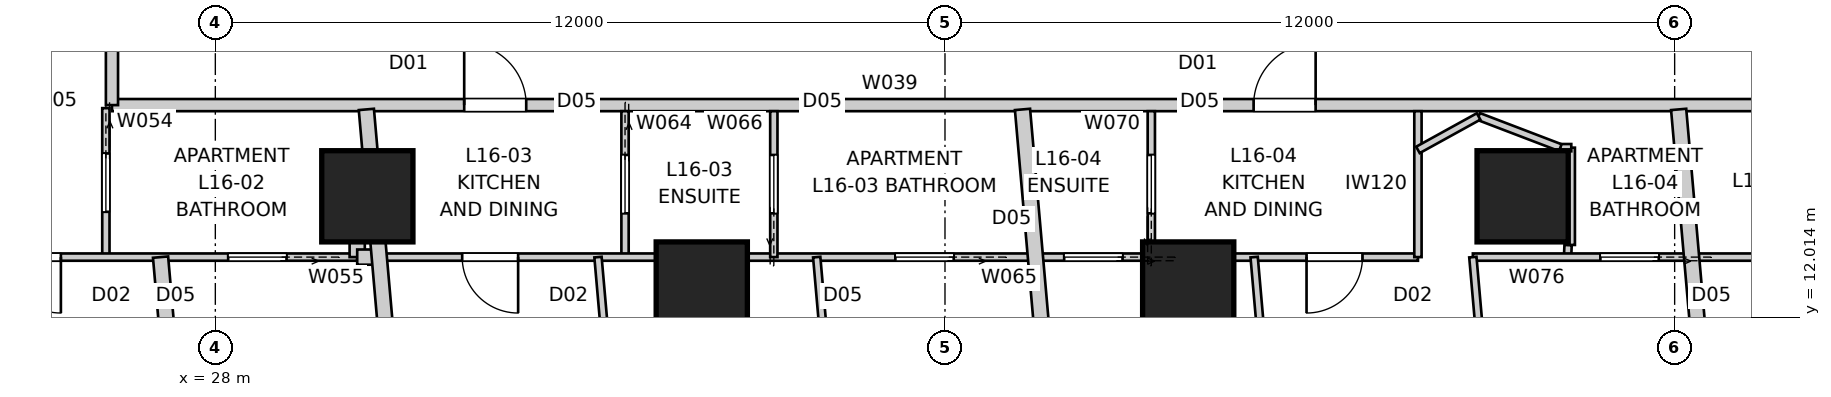
"""IFC4 building model, lengths in metres.
Left out: names, types, materials, properties, quantities, classifications, styles, units other than length and angle.
Written with IfcOpenShell. Run it as: python <this file> out.ifc"""

import sys

from ifc_helpers import new_model, si_unit, direction, frame, frame_2d, origin, origin_2d, place, context, subcontext, project, spatial, rectangle, extrude, element, fill, save


model = new_model("IFC4")
c1 = context("Model", 3, precision=1e-05, world=origin(), true_north=direction((0.0, 1.0)))
c2 = subcontext(c1, "Body", "Model", "MODEL_VIEW")
j1 = project(units=[si_unit("LENGTHUNIT", "METRE"), si_unit("PLANEANGLEUNIT", "RADIAN")], contexts=[c1])
p1 = place(None, origin())
s1 = spatial("IfcSite", under=j1, at=p1, CompositionType="ELEMENT")
p2 = place(p1, origin())
s2 = spatial("IfcBuilding", under=s1, at=p2, CompositionType="ELEMENT")
p3 = place(p2, frame((0.0, 0.0, 60.8)))
s3 = spatial("IfcBuildingStorey", under=s2, at=p3, CompositionType="ELEMENT", Elevation=60.8)
for number, where, z_axis, x_axis in (
    (1, (30.5, 14.0, 0.0), (0.0, 0.0, 1.0), (1.0, 0.0, 0.0)),
    (2, (36.0, 12.5, 0.0), (0.0, 0.0, 1.0), (1.0, 0.0, 0.0)),
    (3, (44.0, 12.5, 0.0), (0.0, 0.0, 1.0), (1.0, 0.0, 0.0)),
    (4, (49.5, 14.0, 0.0), (0.0, 0.0, 1.0), (1.0, 0.0, 0.0)),
):
    element("IfcColumn", number, at=place(p3, frame(where, z_axis=z_axis, x_axis=x_axis)), inside=s3, PredefinedType="COLUMN", context=c2, shape_type="SweptSolid", body=[
        extrude(rectangle(XDim=1.5, YDim=1.5, at=origin_2d()), origin(), (0.0, 0.0, 1.0), 3.4),
    ])
p4 = place(p3, frame((26.3, 15.5, 0.0), z_axis=(0.0, 0.0, 1.0), x_axis=(1.0, 0.0, 0.0)))
e5 = element("IfcWall", 5, at=p4, inside=s3, PredefinedType="PARTITIONING", context=c2, shape_type="SweptSolid", body=[
    extrude(rectangle(XDim=27.4, YDim=0.2, at=frame_2d((13.7, 0.0))), origin(), (0.0, 0.0, 1.0), 3.25),
])
p5 = place(p4, frame((18.776, 0.0, 0.0)))
e6 = element("IfcOpeningElement", 6, at=p5, cuts=e5, PredefinedType="OPENING", context=c2, shape_type="SweptSolid", body=[
    extrude(rectangle(XDim=1.02, YDim=2.34, at=frame_2d((0.51, 1.17))), frame((0.0, 0.11, 0.0), z_axis=(0.0, -1.0, 0.0), x_axis=(1.0, 0.0, 0.0)), (0.0, 0.0, 1.0), 0.22),
])
p6 = place(p4, frame((5.793, 0.0, 0.0)))
e7 = element("IfcOpeningElement", 7, at=p6, cuts=e5, PredefinedType="OPENING", context=c2, shape_type="SweptSolid", body=[
    extrude(rectangle(XDim=1.02, YDim=2.34, at=frame_2d((0.51, 1.17))), frame((0.0, 0.11, 0.0), z_axis=(0.0, -1.0, 0.0), x_axis=(1.0, 0.0, 0.0)), (0.0, 0.0, 1.0), 0.22),
])
p7 = place(p3, frame((26.3, 44.5, 0.0), z_axis=(0.0, 0.0, 1.0), x_axis=(0.0, -1.0, 0.0)))
e8 = element("IfcWall", 8, at=p7, inside=s3, PredefinedType="PARTITIONING", context=c2, shape_type="SweptSolid", body=[
    extrude(rectangle(XDim=29.0, YDim=0.2, at=frame_2d((14.5, 0.0))), origin(), (0.0, 0.0, 1.0), 3.25),
])
p8 = place(p7, frame((6.85, 0.0, 0.0)))
e9 = element("IfcOpeningElement", 9, at=p8, cuts=e8, PredefinedType="OPENING", context=c2, shape_type="SweptSolid", body=[
    extrude(rectangle(XDim=1.02, YDim=2.34, at=frame_2d((0.51, 1.17))), frame((0.0, 0.11, 0.0), z_axis=(0.0, -1.0, 0.0), x_axis=(1.0, 0.0, 0.0)), (0.0, 0.0, 1.0), 0.22),
])
p9 = place(p7, frame((2.345, 0.0, 0.0)))
e10 = element("IfcOpeningElement", 10, at=p9, cuts=e8, PredefinedType="OPENING", context=c2, shape_type="SweptSolid", body=[
    extrude(rectangle(XDim=1.02, YDim=2.1, at=frame_2d((0.51, 1.05))), frame((0.0, 0.11, 0.0), z_axis=(0.0, -1.0, 0.0), x_axis=(1.0, 0.0, 0.0)), (0.0, 0.0, 1.0), 0.22),
])
p10 = place(p7, frame((17.166, 0.0, 0.0)))
e11 = element("IfcOpeningElement", 11, at=p10, cuts=e8, PredefinedType="OPENING", context=c2, shape_type="SweptSolid", body=[
    extrude(rectangle(XDim=1.02, YDim=2.34, at=frame_2d((0.51, 1.17))), frame((0.0, 0.11, 0.0), z_axis=(0.0, -1.0, 0.0), x_axis=(1.0, 0.0, 0.0)), (0.0, 0.0, 1.0), 0.22),
])
p11 = place(p7, frame((27.055, 0.0, 0.0)))
e12 = element("IfcOpeningElement", 12, at=p11, cuts=e8, PredefinedType="OPENING", context=c2, shape_type="SweptSolid", body=[
    extrude(rectangle(XDim=1.02, YDim=2.34, at=frame_2d((0.51, 1.17))), frame((0.0, 0.11, 0.0), z_axis=(0.0, -1.0, 0.0), x_axis=(1.0, 0.0, 0.0)), (0.0, 0.0, 1.0), 0.22),
])
p12 = place(p3, frame((42.222, 4.597, 0.0), z_axis=(0.0, 0.0, 1.0), x_axis=(-0.087140211333, 0.996196056792, 0.0)))
e13 = element("IfcWall", 13, at=p12, inside=s3, PredefinedType="PARTITIONING", context=c2, shape_type="SweptSolid", body=[
    extrude(rectangle(XDim=10.873, YDim=0.25, at=frame_2d((5.437, 0.0))), origin(), (0.0, 0.0, 1.0), 3.25),
])
p13 = place(p3, frame((31.513, 3.66, 0.0), z_axis=(0.0, 0.0, 1.0), x_axis=(-0.087168232078, 0.996193605338, 0.0)))
e14 = element("IfcWall", 14, at=p13, inside=s3, PredefinedType="PARTITIONING", context=c2, shape_type="SweptSolid", body=[
    extrude(rectangle(XDim=11.814, YDim=0.25, at=frame_2d((5.907, 0.0))), origin(), (0.0, 0.0, 1.0), 3.25),
])
p14 = place(p3, frame((52.932, 5.534, 0.0), z_axis=(0.0, 0.0, 1.0), x_axis=(-0.087157803114, 0.996194517831, 0.0)))
e15 = element("IfcWall", 15, at=p14, inside=s3, PredefinedType="PARTITIONING", context=c2, shape_type="SweptSolid", body=[
    extrude(rectangle(XDim=9.933, YDim=0.25, at=frame_2d((4.966, 0.0))), origin(), (0.0, 0.0, 1.0), 3.25),
])
p15 = place(p3, frame((26.2, 15.45, 0.0), z_axis=(0.0, 0.0, 1.0), x_axis=(0.0, -1.0, 0.0)))
e16 = element("IfcWall", 16, at=p15, inside=s3, PredefinedType="PARTITIONING", context=c2, shape_type="SweptSolid", body=[
    extrude(rectangle(XDim=2.45, YDim=0.12, at=frame_2d((1.225, 0.0))), origin(), (0.0, 0.0, 1.0), 3.25),
])
p16 = place(p15, frame((0.745, 0.0, 0.0)))
e17 = element("IfcOpeningElement", 17, at=p16, cuts=e16, PredefinedType="OPENING", context=c2, shape_type="SweptSolid", body=[
    extrude(rectangle(XDim=0.96, YDim=2.1, at=frame_2d((0.48, 1.05))), frame((0.0, 0.07, 0.0), z_axis=(0.0, -1.0, 0.0), x_axis=(1.0, 0.0, 0.0)), (0.0, 0.0, 1.0), 0.14),
])
p17 = place(p3, frame((30.333, 13.0, 0.0), z_axis=(0.0, 0.0, 1.0), x_axis=(-1.0, 0.0, 0.0)))
e18 = element("IfcWall", 18, at=p17, inside=s3, PredefinedType="PARTITIONING", context=c2, shape_type="SweptSolid", body=[
    extrude(rectangle(XDim=6.533, YDim=0.12, at=frame_2d((3.267, 0.0))), origin(), (0.0, 0.0, 1.0), 3.25),
])
p18 = place(p17, frame((4.873, 0.0, 0.0)))
e19 = element("IfcOpeningElement", 19, at=p18, cuts=e18, PredefinedType="OPENING", context=c2, shape_type="SweptSolid", body=[
    extrude(rectangle(XDim=0.92, YDim=2.34, at=frame_2d((0.46, 1.17))), frame((0.0, 0.07, 0.0), z_axis=(0.0, -1.0, 0.0), x_axis=(1.0, 0.0, 0.0)), (0.0, 0.0, 1.0), 0.14),
])
p19 = place(p17, frame((1.162, 0.0, 0.0)))
e20 = element("IfcOpeningElement", 20, at=p19, cuts=e18, PredefinedType="OPENING", context=c2, shape_type="SweptSolid", body=[
    extrude(rectangle(XDim=0.96, YDim=2.1, at=frame_2d((0.48, 1.05))), frame((0.0, 0.07, 0.0), z_axis=(0.0, -1.0, 0.0), x_axis=(1.0, 0.0, 0.0)), (0.0, 0.0, 1.0), 0.14),
])
p20 = place(p3, frame((30.333, 14.396, 0.0), z_axis=(0.0, 0.0, 1.0), x_axis=(0.0, -1.0, 0.0)))
e21 = element("IfcWall", 21, at=p20, inside=s3, PredefinedType="PARTITIONING", context=c2, shape_type="SweptSolid", body=[
    extrude(rectangle(XDim=1.396, YDim=0.25, at=frame_2d((0.698, 0.0))), origin(), (0.0, 0.0, 1.0), 3.25),
])
p21 = place(p3, frame((27.099, 13.0, 0.0), z_axis=(0.0, 0.0, 1.0), x_axis=(0.087158236544, -0.99619447991, 0.0)))
e22 = element("IfcWall", 22, at=p21, inside=s3, PredefinedType="PARTITIONING", context=c2, shape_type="SweptSolid", body=[
    extrude(rectangle(XDim=8.689, YDim=0.25, at=frame_2d((4.344, 0.0))), origin(), (0.0, 0.0, 1.0), 2.638),
])
p22 = place(p3, frame((30.333, 13.0, 0.0), z_axis=(0.0, 0.0, 1.0), x_axis=(1.0, 0.0, 0.0)))
e23 = element("IfcWall", 23, at=p22, inside=s3, PredefinedType="PARTITIONING", context=c2, shape_type="SweptSolid", body=[
    extrude(rectangle(XDim=0.363, YDim=0.25, at=frame_2d((0.182, 0.0))), origin(), (0.0, 0.0, 1.0), 3.25),
])
p23 = place(p3, frame((34.738, 15.4, 0.0), z_axis=(0.0, 0.0, 1.0), x_axis=(0.0, -1.0, 0.0)))
e24 = element("IfcWall", 24, at=p23, inside=s3, PredefinedType="PARTITIONING", context=c2, shape_type="SweptSolid", body=[
    extrude(rectangle(XDim=2.4, YDim=0.12, at=frame_2d((1.2, 0.0))), origin(), (0.0, 0.0, 1.0), 3.25),
])
p24 = place(p23, frame((0.72, 0.0, 0.0)))
e25 = element("IfcOpeningElement", 25, at=p24, cuts=e24, PredefinedType="OPENING", context=c2, shape_type="SweptSolid", body=[
    extrude(rectangle(XDim=0.96, YDim=2.1, at=frame_2d((0.48, 1.05))), frame((0.0, 0.07, 0.0), z_axis=(0.0, -1.0, 0.0), x_axis=(1.0, 0.0, 0.0)), (0.0, 0.0, 1.0), 0.14),
])
p25 = place(p3, frame((47.778, 13.0, 0.0), z_axis=(0.0, 0.0, 1.0), x_axis=(-1.0, 0.0, 0.0)))
e26 = element("IfcWall", 26, at=p25, inside=s3, PredefinedType="PARTITIONING", context=c2, shape_type="SweptSolid", body=[
    extrude(rectangle(XDim=17.082, YDim=0.12, at=frame_2d((8.541, 0.0))), origin(), (0.0, 0.0, 1.0), 2.55),
])
p26 = place(p25, frame((0.912, 0.0, 0.0)))
e27 = element("IfcOpeningElement", 27, at=p26, cuts=e26, PredefinedType="OPENING", context=c2, shape_type="SweptSolid", body=[
    extrude(rectangle(XDim=0.92, YDim=2.34, at=frame_2d((0.46, 1.17))), frame((0.0, 0.07, 0.0), z_axis=(0.0, -1.0, 0.0), x_axis=(1.0, 0.0, 0.0)), (0.0, 0.0, 1.0), 0.14),
])
p27 = place(p25, frame((14.798, 0.0, 0.0)))
e28 = element("IfcOpeningElement", 28, at=p27, cuts=e26, PredefinedType="OPENING", context=c2, shape_type="SweptSolid", body=[
    extrude(rectangle(XDim=0.92, YDim=2.34, at=frame_2d((0.46, 1.17))), frame((0.0, 0.07, 0.0), z_axis=(0.0, -1.0, 0.0), x_axis=(1.0, 0.0, 0.0)), (0.0, 0.0, 1.0), 0.14),
])
p28 = place(p25, frame((4.858, 0.0, 0.0)))
e29 = element("IfcOpeningElement", 29, at=p28, cuts=e26, PredefinedType="OPENING", context=c2, shape_type="SweptSolid", body=[
    extrude(rectangle(XDim=0.96, YDim=2.1, at=frame_2d((0.48, 1.05))), frame((0.0, 0.07, 0.0), z_axis=(0.0, -1.0, 0.0), x_axis=(1.0, 0.0, 0.0)), (0.0, 0.0, 1.0), 0.14),
])
p29 = place(p25, frame((7.635, 0.0, 0.0)))
e30 = element("IfcOpeningElement", 30, at=p29, cuts=e26, PredefinedType="OPENING", context=c2, shape_type="SweptSolid", body=[
    extrude(rectangle(XDim=0.96, YDim=2.1, at=frame_2d((0.48, 1.05))), frame((0.0, 0.07, 0.0), z_axis=(0.0, -1.0, 0.0), x_axis=(1.0, 0.0, 0.0)), (0.0, 0.0, 1.0), 0.14),
])
p30 = place(p3, frame((37.185, 13.0, 0.0), z_axis=(0.0, 0.0, 1.0), x_axis=(0.0, 1.0, 0.0)))
e31 = element("IfcWall", 31, at=p30, inside=s3, PredefinedType="PARTITIONING", context=c2, shape_type="SweptSolid", body=[
    extrude(rectangle(XDim=2.4, YDim=0.12, at=frame_2d((1.2, 0.0))), origin(), (0.0, 0.0, 1.0), 2.796),
])
p31 = place(p30, frame((0.72, 0.0, 0.0)))
e32 = element("IfcOpeningElement", 32, at=p31, cuts=e31, PredefinedType="OPENING", context=c2, shape_type="SweptSolid", body=[
    extrude(rectangle(XDim=0.96, YDim=2.1, at=frame_2d((0.48, 1.05))), frame((0.0, 0.07, 0.0), z_axis=(0.0, -1.0, 0.0), x_axis=(1.0, 0.0, 0.0)), (0.0, 0.0, 1.0), 0.14),
])
p32 = place(p3, frame((34.293, 13.0, 0.0), z_axis=(0.0, 0.0, 1.0), x_axis=(0.087160907995, -0.996194246178, 0.0)))
e33 = element("IfcWall", 33, at=p32, inside=s3, PredefinedType="PARTITIONING", context=c2, shape_type="SweptSolid", body=[
    extrude(rectangle(XDim=9.022, YDim=0.12, at=frame_2d((4.511, 0.0))), origin(), (0.0, 0.0, 1.0), 3.25),
])
p33 = place(p32, frame((4.071, 0.0, 0.0)))
e34 = element("IfcOpeningElement", 34, at=p33, cuts=e33, PredefinedType="OPENING", context=c2, shape_type="SweptSolid", body=[
    extrude(rectangle(XDim=0.92, YDim=2.34, at=frame_2d((0.46, 1.17))), frame((0.0, 0.07, 0.0), z_axis=(0.0, -1.0, 0.0), x_axis=(1.0, 0.0, 0.0)), (0.0, 0.0, 1.0), 0.14),
])
p34 = place(p3, frame((37.89, 13.0, 0.0), z_axis=(0.0, 0.0, 1.0), x_axis=(0.087158256162, -0.996194478193, 0.0)))
e35 = element("IfcWall", 35, at=p34, inside=s3, PredefinedType="PARTITIONING", context=c2, shape_type="SweptSolid", body=[
    extrude(rectangle(XDim=8.709, YDim=0.12, at=frame_2d((4.354, 0.0))), origin(), (0.0, 0.0, 1.0), 3.25),
])
p35 = place(p3, frame((47.778, 15.4, 0.0), z_axis=(0.0, 0.0, 1.0), x_axis=(0.0, -1.0, 0.0)))
e36 = element("IfcWall", 36, at=p35, inside=s3, PredefinedType="PARTITIONING", context=c2, shape_type="SweptSolid", body=[
    extrude(rectangle(XDim=2.4, YDim=0.12, at=frame_2d((1.2, 0.0))), origin(), (0.0, 0.0, 1.0), 3.25),
])
p36 = place(p3, frame((43.393, 13.0, 0.0), z_axis=(0.0, 0.0, 1.0), x_axis=(0.0, 1.0, 0.0)))
e37 = element("IfcWall", 37, at=p36, inside=s3, PredefinedType="PARTITIONING", context=c2, shape_type="SweptSolid", body=[
    extrude(rectangle(XDim=2.4, YDim=0.12, at=frame_2d((1.2, 0.0))), origin(), (0.0, 0.0, 1.0), 3.25),
])
p37 = place(p36, frame((0.72, 0.0, 0.0)))
e38 = element("IfcOpeningElement", 38, at=p37, cuts=e37, PredefinedType="OPENING", context=c2, shape_type="SweptSolid", body=[
    extrude(rectangle(XDim=0.96, YDim=2.1, at=frame_2d((0.48, 1.05))), frame((0.0, 0.07, 0.0), z_axis=(0.0, -1.0, 0.0), x_axis=(1.0, 0.0, 0.0)), (0.0, 0.0, 1.0), 0.14),
])
p38 = place(p3, frame((50.239, 13.0, 0.0), z_axis=(0.0, 0.0, 1.0), x_axis=(0.045131013234, 0.99898107672, 0.0)))
e39 = element("IfcWall", 39, at=p38, inside=s3, PredefinedType="PARTITIONING", context=c2, shape_type="SweptSolid", body=[
    extrude(rectangle(XDim=0.2, YDim=0.12, at=frame_2d((0.1, 0.0))), origin(), (0.0, 0.0, 1.0), 3.25),
])
p39 = place(p3, frame((50.3, 13.2, 0.0), z_axis=(0.0, 0.0, 1.0), x_axis=(0.0, 1.0, 0.0)))
e40 = element("IfcWall", 40, at=p39, inside=s3, PredefinedType="PARTITIONING", context=c2, shape_type="SweptSolid", body=[
    extrude(rectangle(XDim=1.6, YDim=0.12, at=frame_2d((0.8, 0.0))), origin(), (0.0, 0.0, 1.0), 3.25),
])
p40 = place(p3, frame((50.119, 14.8, 0.0), z_axis=(0.0, 0.0, 1.0), x_axis=(-0.934135067997, 0.356919703488, 0.0)))
e41 = element("IfcWall", 41, at=p40, inside=s3, PredefinedType="PARTITIONING", context=c2, shape_type="SweptSolid", body=[
    extrude(rectangle(XDim=1.438, YDim=0.12, at=frame_2d((0.719, 0.0))), origin(), (0.0, 0.0, 1.0), 3.25),
])
p41 = place(p3, frame((48.775, 15.313, 0.0), z_axis=(0.0, 0.0, 1.0), x_axis=(-0.875508887439, -0.483202015741, 0.0)))
e42 = element("IfcWall", 42, at=p41, inside=s3, PredefinedType="PARTITIONING", context=c2, shape_type="SweptSolid", body=[
    extrude(rectangle(XDim=1.139, YDim=0.12, at=frame_2d((0.569, 0.0))), origin(), (0.0, 0.0, 1.0), 3.25),
])
p42 = place(p3, frame((56.2, 13.0, 0.0), z_axis=(0.0, 0.0, 1.0), x_axis=(-1.0, 0.0, 0.0)))
e43 = element("IfcWall", 43, at=p42, inside=s3, PredefinedType="PARTITIONING", context=c2, shape_type="SweptSolid", body=[
    extrude(rectangle(XDim=7.519, YDim=0.12, at=frame_2d((3.759, 0.0))), origin(), (0.0, 0.0, 1.0), 3.25),
])
p43 = place(p42, frame((1.618, 0.0, 0.0)))
e44 = element("IfcOpeningElement", 44, at=p43, cuts=e43, PredefinedType="OPENING", context=c2, shape_type="SweptSolid", body=[
    extrude(rectangle(XDim=0.96, YDim=2.1, at=frame_2d((0.48, 1.05))), frame((0.0, 0.07, 0.0), z_axis=(0.0, -1.0, 0.0), x_axis=(1.0, 0.0, 0.0)), (0.0, 0.0, 1.0), 0.14),
])
p44 = place(p42, frame((4.461, 0.0, 0.0)))
e45 = element("IfcOpeningElement", 45, at=p44, cuts=e43, PredefinedType="OPENING", context=c2, shape_type="SweptSolid", body=[
    extrude(rectangle(XDim=0.96, YDim=2.1, at=frame_2d((0.48, 1.05))), frame((0.0, 0.07, 0.0), z_axis=(0.0, -1.0, 0.0), x_axis=(1.0, 0.0, 0.0)), (0.0, 0.0, 1.0), 0.14),
])
p45 = place(p3, frame((45.084, 13.0, 0.0), z_axis=(0.0, 0.0, 1.0), x_axis=(0.087184938313, -0.99619214338, 0.0)))
e46 = element("IfcWall", 46, at=p45, inside=s3, PredefinedType="PARTITIONING", context=c2, shape_type="SweptSolid", body=[
    extrude(rectangle(XDim=8.082, YDim=0.12, at=frame_2d((4.041, 0.0))), origin(), (0.0, 0.0, 1.0), 3.25),
])
p46 = place(p3, frame((48.681, 13.0, 0.0), z_axis=(0.0, 0.0, 1.0), x_axis=(0.0871517452, -0.996195047824, 0.0)))
e47 = element("IfcWall", 47, at=p46, inside=s3, PredefinedType="PARTITIONING", context=c2, shape_type="SweptSolid", body=[
    extrude(rectangle(XDim=7.768, YDim=0.12, at=frame_2d((3.884, 0.0))), origin(), (0.0, 0.0, 1.0), 3.25),
])
p47 = place(p46, frame((3.444, 0.0, 0.0)))
e48 = element("IfcOpeningElement", 48, at=p47, cuts=e47, PredefinedType="OPENING", context=c2, shape_type="SweptSolid", body=[
    extrude(rectangle(XDim=0.92, YDim=2.34, at=frame_2d((0.46, 1.17))), frame((0.0, 0.07, 0.0), z_axis=(0.0, -1.0, 0.0), x_axis=(1.0, 0.0, 0.0)), (0.0, 0.0, 1.0), 0.14),
])
p48 = place(p3, frame((50.3, 14.8, 0.0), z_axis=(0.0, 0.0, 1.0), x_axis=(-1.0, 0.0, 0.0)))
e49 = element("IfcWall", 49, at=p48, inside=s3, PredefinedType="PARTITIONING", context=c2, shape_type="SweptSolid", body=[
    extrude(rectangle(XDim=0.181, YDim=0.12, at=frame_2d((0.09, 0.0))), origin(), (0.0, 0.0, 1.0), 3.25),
])
p49 = place(p5, origin())
e50 = element("IfcDoor", 50, at=p49, inside=s3, OperationType="SINGLE_SWING_RIGHT", PredefinedType="DOOR", context=c2, shape_type="SweptSolid", body=[
    extrude(rectangle(XDim=1.02, YDim=2.34, at=frame_2d((0.51, 1.17))), frame((0.0, 0.025, 0.0), z_axis=(0.0, -1.0, 0.0), x_axis=(1.0, 0.0, 0.0)), (0.0, 0.0, 1.0), 0.05),
])
fill(e6, e50)
p50 = place(p6, origin())
e51 = element("IfcDoor", 51, at=p50, inside=s3, OperationType="SINGLE_SWING_LEFT", PredefinedType="DOOR", context=c2, shape_type="SweptSolid", body=[
    extrude(rectangle(XDim=1.02, YDim=2.34, at=frame_2d((0.51, 1.17))), frame((0.0, 0.025, 0.0), z_axis=(0.0, -1.0, 0.0), x_axis=(1.0, 0.0, 0.0)), (0.0, 0.0, 1.0), 0.05),
])
fill(e7, e51)
p51 = place(p26, origin())
e52 = element("IfcDoor", 52, at=p51, inside=s3, OperationType="SINGLE_SWING_RIGHT", PredefinedType="DOOR", context=c2, shape_type="SweptSolid", body=[
    extrude(rectangle(XDim=0.92, YDim=2.34, at=frame_2d((0.46, 1.17))), frame((0.0, 0.025, 0.0), z_axis=(0.0, -1.0, 0.0), x_axis=(1.0, 0.0, 0.0)), (0.0, 0.0, 1.0), 0.05),
])
fill(e27, e52)
p52 = place(p37, origin())
e53 = element("IfcDoor", 53, at=p52, inside=s3, OperationType="SLIDING_TO_LEFT", PredefinedType="DOOR", context=c2, shape_type="SweptSolid", body=[
    extrude(rectangle(XDim=0.96, YDim=2.1, at=frame_2d((0.48, 1.05))), frame((0.0, 0.025, 0.0), z_axis=(0.0, -1.0, 0.0), x_axis=(1.0, 0.0, 0.0)), (0.0, 0.0, 1.0), 0.05),
])
fill(e38, e53)
p53 = place(p27, origin())
e54 = element("IfcDoor", 54, at=p53, inside=s3, OperationType="SINGLE_SWING_LEFT", PredefinedType="DOOR", context=c2, shape_type="SweptSolid", body=[
    extrude(rectangle(XDim=0.92, YDim=2.34, at=frame_2d((0.46, 1.17))), frame((0.0, 0.025, 0.0), z_axis=(0.0, -1.0, 0.0), x_axis=(1.0, 0.0, 0.0)), (0.0, 0.0, 1.0), 0.05),
])
fill(e28, e54)
p54 = place(p24, origin())
e55 = element("IfcDoor", 55, at=p54, inside=s3, OperationType="SLIDING_TO_LEFT", PredefinedType="DOOR", context=c2, shape_type="SweptSolid", body=[
    extrude(rectangle(XDim=0.96, YDim=2.1, at=frame_2d((0.48, 1.05))), frame((0.0, 0.025, 0.0), z_axis=(0.0, -1.0, 0.0), x_axis=(1.0, 0.0, 0.0)), (0.0, 0.0, 1.0), 0.05),
])
fill(e25, e55)
p55 = place(p16, origin())
e56 = element("IfcDoor", 56, at=p55, inside=s3, OperationType="SLIDING_TO_LEFT", PredefinedType="DOOR", context=c2, shape_type="SweptSolid", body=[
    extrude(rectangle(XDim=0.96, YDim=2.1, at=frame_2d((0.48, 1.05))), frame((0.0, 0.025, 0.0), z_axis=(0.0, -1.0, 0.0), x_axis=(1.0, 0.0, 0.0)), (0.0, 0.0, 1.0), 0.05),
])
fill(e17, e56)
p56 = place(p18, origin())
e57 = element("IfcDoor", 57, at=p56, inside=s3, OperationType="SINGLE_SWING_LEFT", PredefinedType="DOOR", context=c2, shape_type="SweptSolid", body=[
    extrude(rectangle(XDim=0.92, YDim=2.34, at=frame_2d((0.46, 1.17))), frame((0.0, 0.025, 0.0), z_axis=(0.0, -1.0, 0.0), x_axis=(1.0, 0.0, 0.0)), (0.0, 0.0, 1.0), 0.05),
])
fill(e19, e57)
p57 = place(p28, origin())
e58 = element("IfcDoor", 58, at=p57, inside=s3, OperationType="SLIDING_TO_LEFT", PredefinedType="DOOR", context=c2, shape_type="SweptSolid", body=[
    extrude(rectangle(XDim=0.96, YDim=2.1, at=frame_2d((0.48, 1.05))), frame((0.0, 0.025, 0.0), z_axis=(0.0, -1.0, 0.0), x_axis=(1.0, 0.0, 0.0)), (0.0, 0.0, 1.0), 0.05),
])
fill(e29, e58)
p58 = place(p31, origin())
e59 = element("IfcDoor", 59, at=p58, inside=s3, OperationType="SLIDING_TO_LEFT", PredefinedType="DOOR", context=c2, shape_type="SweptSolid", body=[
    extrude(rectangle(XDim=0.96, YDim=2.1, at=frame_2d((0.48, 1.05))), frame((0.0, 0.025, 0.0), z_axis=(0.0, -1.0, 0.0), x_axis=(1.0, 0.0, 0.0)), (0.0, 0.0, 1.0), 0.05),
])
fill(e32, e59)
p59 = place(p19, origin())
e60 = element("IfcDoor", 60, at=p59, inside=s3, OperationType="SLIDING_TO_LEFT", PredefinedType="DOOR", context=c2, shape_type="SweptSolid", body=[
    extrude(rectangle(XDim=0.96, YDim=2.1, at=frame_2d((0.48, 1.05))), frame((0.0, 0.025, 0.0), z_axis=(0.0, -1.0, 0.0), x_axis=(1.0, 0.0, 0.0)), (0.0, 0.0, 1.0), 0.05),
])
fill(e20, e60)
p60 = place(p29, origin())
e61 = element("IfcDoor", 61, at=p60, inside=s3, OperationType="SLIDING_TO_LEFT", PredefinedType="DOOR", context=c2, shape_type="SweptSolid", body=[
    extrude(rectangle(XDim=0.96, YDim=2.1, at=frame_2d((0.48, 1.05))), frame((0.0, 0.025, 0.0), z_axis=(0.0, -1.0, 0.0), x_axis=(1.0, 0.0, 0.0)), (0.0, 0.0, 1.0), 0.05),
])
fill(e30, e61)
p61 = place(p44, origin())
e62 = element("IfcDoor", 62, at=p61, inside=s3, OperationType="SLIDING_TO_LEFT", PredefinedType="DOOR", context=c2, shape_type="SweptSolid", body=[
    extrude(rectangle(XDim=0.96, YDim=2.1, at=frame_2d((0.48, 1.05))), frame((0.0, 0.025, 0.0), z_axis=(0.0, -1.0, 0.0), x_axis=(1.0, 0.0, 0.0)), (0.0, 0.0, 1.0), 0.05),
])
fill(e45, e62)
save(model, sys.argv[1])
